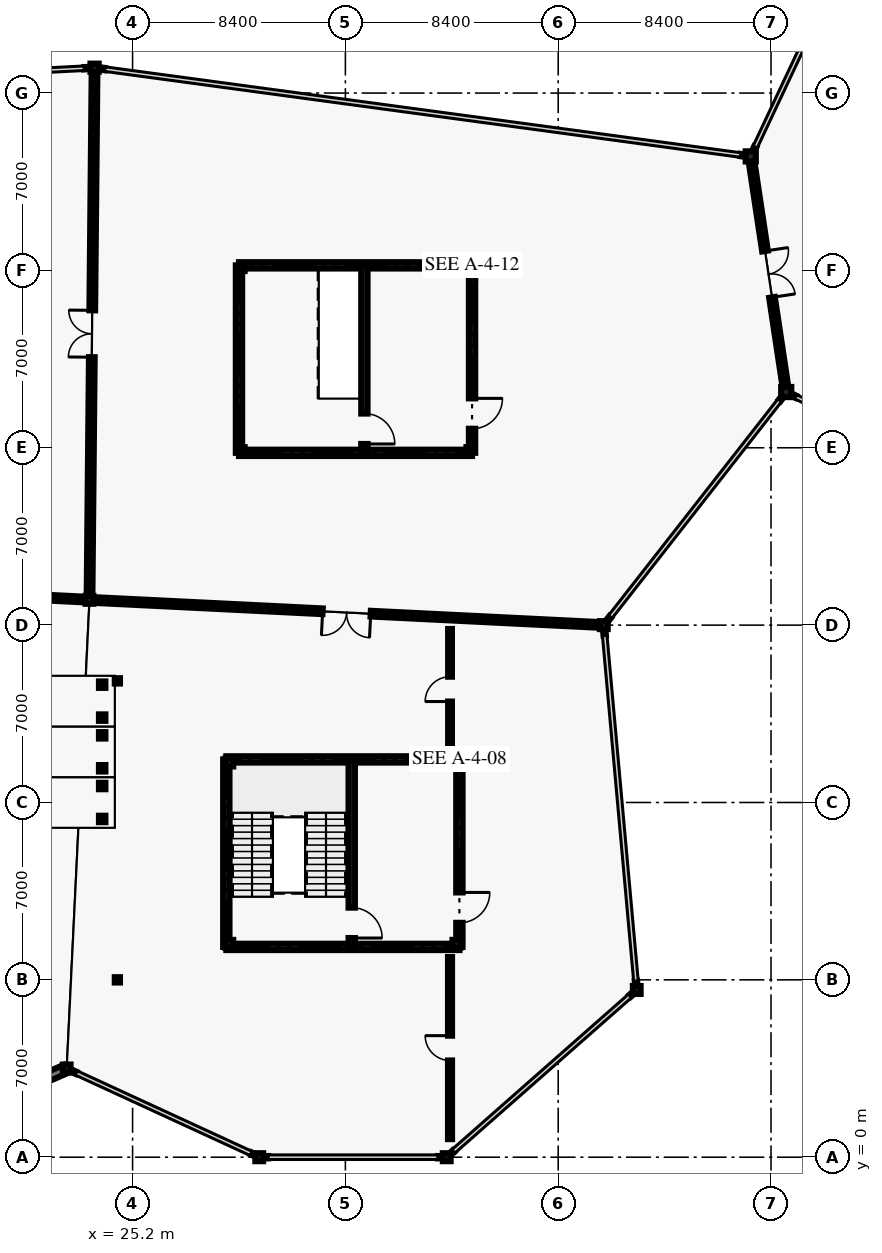
"""IFC4 building model, lengths in metres.
Left out: names, types, materials, properties, quantities, classifications, styles, units other than length and angle.
Written with IfcOpenShell. Run it as: python <this file> out.ifc"""

import sys

from ifc_helpers import new_model, si_unit, direction, frame, frame_2d, origin, origin_2d, place, context, subcontext, project, spatial, rectangle, hollow_circle, i_section, extrude, element, fill, save


model = new_model("IFC4")
c1 = context("Model", 3, precision=1e-05, world=origin(), true_north=direction((0.0, 1.0)))
c2 = subcontext(c1, "Body", "Model", "MODEL_VIEW")
j1 = project(units=[si_unit("LENGTHUNIT", "METRE"), si_unit("PLANEANGLEUNIT", "RADIAN")], contexts=[c1])
p1 = place(None, origin())
s1 = spatial("IfcSite", under=j1, at=p1, CompositionType="ELEMENT")
p2 = place(p1, origin())
s2 = spatial("IfcBuilding", under=s1, at=p2, CompositionType="ELEMENT")
p3 = place(p2, frame((0.0, 0.0, 5.4)))
s3 = spatial("IfcBuildingStorey", under=s2, at=p3, CompositionType="ELEMENT", Elevation=5.4)
for number, where, z_axis, x_axis in (
    (1, (22.6, 3.5, 0.0), (0.0, 0.0, 1.0), (1.0, 0.0, 0.0)),
    (2, (23.5, 22.0, 0.0), (0.0, 0.0, 1.0), (1.0, 0.0, 0.0)),
):
    element("IfcColumn", number, at=place(p3, frame(where, z_axis=z_axis, x_axis=x_axis)), inside=s3, PredefinedType="COLUMN", context=c2, shape_type="SweptSolid", body=[
        extrude(i_section(OverallWidth=0.307, OverallDepth=0.315, WebThickness=0.012, FlangeThickness=0.019, FilletRadius=0.017, at=origin_2d()), origin(), (0.0, 0.0, 1.0), 4.8),
    ])
p4 = place(p3, frame((23.7, 43.0, 0.0), z_axis=(0.0, 0.0, 1.0), x_axis=(1.0, 0.0, 0.0)))
e3 = element("IfcColumn", 3, at=p4, inside=s3, PredefinedType="COLUMN", context=c2, shape_type="SweptSolid", body=[
    extrude(hollow_circle(Radius=0.162, WallThickness=0.01, at=origin_2d()), origin(), (0.0, 0.0, 1.0), 4.8),
])
for number, where, z_axis, x_axis in (
    (4, (30.2, 0.0, 0.0), (0.0, 0.0, 1.0), (1.0, 0.0, 0.0)),
    (5, (37.6, 0.0, 0.0), (0.0, 0.0, 1.0), (1.0, 0.0, 0.0)),
    (6, (43.8, 21.0, 0.0), (0.0, 0.0, 1.0), (1.0, 0.0, 0.0)),
    (7, (45.1, 6.6, 0.0), (0.0, 0.0, 1.0), (1.0, 0.0, 0.0)),
):
    element("IfcColumn", number, at=place(p3, frame(where, z_axis=z_axis, x_axis=x_axis)), inside=s3, PredefinedType="COLUMN", context=c2, shape_type="SweptSolid", body=[
        extrude(i_section(OverallWidth=0.307, OverallDepth=0.315, WebThickness=0.012, FlangeThickness=0.019, FilletRadius=0.017, at=origin_2d()), origin(), (0.0, 0.0, 1.0), 4.8),
    ])
for number, where, z_axis, x_axis in (
    (8, (49.6, 39.5, 0.0), (0.0, 0.0, 1.0), (1.0, 0.0, 0.0)),
    (9, (51.0, 30.2, 0.0), (0.0, 0.0, 1.0), (1.0, 0.0, 0.0)),
):
    element("IfcColumn", number, at=place(p3, frame(where, z_axis=z_axis, x_axis=x_axis)), inside=s3, PredefinedType="COLUMN", context=c2, shape_type="SweptSolid", body=[
        extrude(i_section(OverallWidth=0.4, OverallDepth=0.4, WebThickness=0.022, FlangeThickness=0.036, at=origin_2d()), origin(), (0.0, 0.0, 1.0), 4.8),
    ])
for number, where, z_axis, x_axis in (
    (10, (29.02, 8.42, 0.0), (0.0, 0.0, 1.0), (1.0, 0.0, 0.0)),
    (11, (37.98, 8.42, 0.0), (0.0, 0.0, 1.0), (1.0, 0.0, 0.0)),
    (12, (37.98, 15.58, 0.0), (0.0, 0.0, 1.0), (1.0, 0.0, 0.0)),
    (13, (29.02, 15.58, 0.0), (0.0, 0.0, 1.0), (1.0, 0.0, 0.0)),
):
    element("IfcColumn", number, at=place(p3, frame(where, z_axis=z_axis, x_axis=x_axis)), inside=s3, PredefinedType="COLUMN", context=c2, shape_type="SweptSolid", body=[
        extrude(i_section(OverallWidth=0.307, OverallDepth=0.315, WebThickness=0.012, FlangeThickness=0.019, FilletRadius=0.017, at=origin_2d()), origin(), (0.0, 0.0, 1.0), 4.8),
    ])
for number, where, z_axis, x_axis in (
    (14, (29.52, 27.92, 0.0), (0.0, 0.0, 1.0), (1.0, 0.0, 0.0)),
    (15, (38.48, 27.92, 0.0), (0.0, 0.0, 1.0), (1.0, 0.0, 0.0)),
    (16, (38.48, 35.08, 0.0), (0.0, 0.0, 1.0), (1.0, 0.0, 0.0)),
    (17, (29.52, 35.08, 0.0), (0.0, 0.0, 1.0), (1.0, 0.0, 0.0)),
    (18, (24.6, 7.0, 0.0), (0.0, 0.0, 1.0), (1.0, 0.0, 0.0)),
    (19, (24.6, 18.8, 0.0), (0.0, 0.0, 1.0), (1.0, 0.0, 0.0)),
):
    element("IfcColumn", number, at=place(p3, frame(where, z_axis=z_axis, x_axis=x_axis)), inside=s3, PredefinedType="COLUMN", context=c2, shape_type="SweptSolid", body=[
        extrude(i_section(OverallWidth=0.205, OverallDepth=0.21, WebThickness=0.009, FlangeThickness=0.014, FilletRadius=0.01, at=origin_2d()), origin(), (0.0, 0.0, 1.0), 4.8),
    ])
for number, where, z_axis, x_axis in (
    (20, (24.0, 13.35, 0.0), (0.0, 0.0, 1.0), (1.0, 0.0, 0.0)),
    (21, (24.0, 14.65, 0.0), (0.0, 0.0, 1.0), (1.0, 0.0, 0.0)),
):
    element("IfcColumn", number, at=place(p3, frame(where, z_axis=z_axis, x_axis=x_axis)), inside=s3, PredefinedType="COLUMN", context=c2, shape_type="SweptSolid", body=[
        extrude(i_section(OverallWidth=0.254, OverallDepth=0.254, WebThickness=0.009, FlangeThickness=0.014, FilletRadius=0.013, at=origin_2d()), origin(), (0.0, 0.0, 1.0), 0.295),
    ])
for number, where, z_axis, x_axis in (
    (22, (24.0, 15.35, 0.0), (0.0, 0.0, 1.0), (1.0, 0.0, 0.0)),
    (23, (24.0, 16.65, 0.0), (0.0, 0.0, 1.0), (1.0, 0.0, 0.0)),
):
    element("IfcColumn", number, at=place(p3, frame(where, z_axis=z_axis, x_axis=x_axis)), inside=s3, PredefinedType="COLUMN", context=c2, shape_type="SweptSolid", body=[
        extrude(i_section(OverallWidth=0.254, OverallDepth=0.254, WebThickness=0.009, FlangeThickness=0.014, FilletRadius=0.013, at=origin_2d()), origin(), (0.0, 0.0, 1.0), 0.745),
    ])
for number, where, z_axis, x_axis in (
    (24, (24.0, 17.35, 0.0), (0.0, 0.0, 1.0), (1.0, 0.0, 0.0)),
    (25, (24.0, 18.65, 0.0), (0.0, 0.0, 1.0), (1.0, 0.0, 0.0)),
):
    element("IfcColumn", number, at=place(p3, frame(where, z_axis=z_axis, x_axis=x_axis)), inside=s3, PredefinedType="COLUMN", context=c2, shape_type="SweptSolid", body=[
        extrude(i_section(OverallWidth=0.254, OverallDepth=0.254, WebThickness=0.009, FlangeThickness=0.014, FilletRadius=0.013, at=origin_2d()), origin(), (0.0, 0.0, 1.0), 1.195),
    ])
p5 = place(p3, frame((51.368, 30.018, 0.0), z_axis=(0.0, 0.0, 1.0), x_axis=(-0.896952807524, 0.44212629539, 0.0)))
e26 = element("IfcWall", 26, at=p5, inside=s3, PredefinedType="SOLIDWALL", context=c2, shape_type="SweptSolid", body=[
    extrude(rectangle(XDim=0.308, YDim=0.095, at=frame_2d((0.154, 0.0))), origin(), (0.0, 0.0, 1.0), 3.62),
])
p6 = place(p3, frame((49.644, 39.592, 0.0), z_axis=(0.0, 0.0, 1.0), x_axis=(0.42457593243, 0.905392333522, 0.0)))
e27 = element("IfcWall", 27, at=p6, inside=s3, PredefinedType="SOLIDWALL", context=c2, shape_type="SweptSolid", body=[
    extrude(rectangle(XDim=0.308, YDim=0.095, at=frame_2d((0.154, 0.0))), origin(), (0.0, 0.0, 1.0), 3.62),
])
p7 = place(p3, frame((22.545, 3.476, 0.0), z_axis=(0.0, 0.0, 1.0), x_axis=(-0.916148288852, -0.400839510069, 0.0)))
e28 = element("IfcWall", 28, at=p7, inside=s3, PredefinedType="SOLIDWALL", context=c2, shape_type="SweptSolid", body=[
    extrude(rectangle(XDim=8.672, YDim=0.36, at=frame_2d((4.336, 0.0))), origin(), (0.0, 0.0, 1.0), 3.62),
])
for number, where, z_axis, x_axis in (
    (29, (30.162, 0.018, 0.0), (0.0, 0.0, 1.0), (-0.91, 0.416, 0.0)),
    (30, (22.972, 3.329, 0.0), (0.0, 0.0, 1.0), (-0.91, 0.416, 0.0)),
):
    element("IfcWall", number, at=place(p3, frame(where, z_axis=z_axis, x_axis=x_axis)), inside=s3, PredefinedType="SOLIDWALL", context=c2, shape_type="SweptSolid", body=[
        extrude(rectangle(XDim=0.308, YDim=0.095, at=frame_2d((0.154, 0.0))), origin(), (0.0, 0.0, 1.0), 3.62),
    ])
for number, where, z_axis, x_axis in (
    (31, (37.558, 0.0, 0.0), (0.0, 0.0, 1.0), (-1.0, 0.0, 0.0)),
    (32, (30.55, 0.0, 0.0), (0.0, 0.0, 1.0), (-1.0, 0.0, 0.0)),
):
    element("IfcWall", number, at=place(p3, frame(where, z_axis=z_axis, x_axis=x_axis)), inside=s3, PredefinedType="SOLIDWALL", context=c2, shape_type="SweptSolid", body=[
        extrude(rectangle(XDim=0.308, YDim=0.095, at=frame_2d((0.154, 0.0))), origin(), (0.0, 0.0, 1.0), 3.62),
    ])
p8 = place(p3, frame((45.068, 6.572, 0.0), z_axis=(0.0, 0.0, 1.0), x_axis=(-0.75124833206, -0.660019653932, 0.0)))
e33 = element("IfcWall", 33, at=p8, inside=s3, PredefinedType="SOLIDWALL", context=c2, shape_type="SweptSolid", body=[
    extrude(rectangle(XDim=0.308, YDim=0.095, at=frame_2d((0.154, 0.0))), origin(), (0.0, 0.0, 1.0), 3.62),
])
p9 = place(p3, frame((37.863, 0.231, 0.0), z_axis=(0.0, 0.0, 1.0), x_axis=(-0.751296149946, -0.659965222627, 0.0)))
e34 = element("IfcWall", 34, at=p9, inside=s3, PredefinedType="SOLIDWALL", context=c2, shape_type="SweptSolid", body=[
    extrude(rectangle(XDim=0.307, YDim=0.095, at=frame_2d((0.154, 0.0))), origin(), (0.0, 0.0, 1.0), 3.62),
])
for number, where, z_axis, x_axis in (
    (35, (43.809, 20.898, 0.0), (0.0, 0.0, 1.0), (0.087, -0.996, 0.0)),
    (36, (45.069, 6.949, 0.0), (0.0, 0.0, 1.0), (0.087, -0.996, 0.0)),
):
    element("IfcWall", number, at=place(p3, frame(where, z_axis=z_axis, x_axis=x_axis)), inside=s3, PredefinedType="SOLIDWALL", context=c2, shape_type="SweptSolid", body=[
        extrude(rectangle(XDim=0.308, YDim=0.095, at=frame_2d((0.154, 0.0))), origin(), (0.0, 0.0, 1.0), 3.62),
    ])
p10 = place(p3, frame((23.29, 42.979, 0.0), z_axis=(0.0, 0.0, 1.0), x_axis=(0.998633100652, 0.052267870454, 0.0)))
e37 = element("IfcWall", 37, at=p10, inside=s3, PredefinedType="SOLIDWALL", context=c2, shape_type="SweptSolid", body=[
    extrude(rectangle(XDim=0.308, YDim=0.095, at=frame_2d((0.154, 0.0))), origin(), (0.0, 0.0, 1.0), 3.62),
])
p11 = place(p3, frame((50.937, 30.12, 0.0), z_axis=(0.0, 0.0, 1.0), x_axis=(-0.615582622046, -0.788072354188, 0.0)))
e38 = element("IfcWall", 38, at=p11, inside=s3, PredefinedType="SOLIDWALL", context=c2, shape_type="SweptSolid", body=[
    extrude(rectangle(XDim=0.309, YDim=0.095, at=frame_2d((0.154, 0.0))), origin(), (0.0, 0.0, 1.0), 3.62),
])
p12 = place(p3, frame((44.053, 21.323, 0.0), z_axis=(0.0, 0.0, 1.0), x_axis=(-0.615966636313, -0.787772240529, 0.0)))
e39 = element("IfcWall", 39, at=p12, inside=s3, PredefinedType="SOLIDWALL", context=c2, shape_type="SweptSolid", body=[
    extrude(rectangle(XDim=0.308, YDim=0.095, at=frame_2d((0.154, 0.0))), origin(), (0.0, 0.0, 1.0), 3.62),
])
for number, where, z_axis, x_axis in (
    (40, (23.802, 42.986, 0.0), (0.0, 0.0, 1.0), (0.991, -0.133, 0.0)),
    (41, (49.194, 39.555, 0.0), (0.0, 0.0, 1.0), (0.991, -0.133, 0.0)),
):
    element("IfcWall", number, at=place(p3, frame(where, z_axis=z_axis, x_axis=x_axis)), inside=s3, PredefinedType="SOLIDWALL", context=c2, shape_type="SweptSolid", body=[
        extrude(rectangle(XDim=0.308, YDim=0.095, at=frame_2d((0.154, 0.0))), origin(), (0.0, 0.0, 1.0), 3.62),
    ])
p13 = place(p3, frame((49.6, 39.5, 0.0), z_axis=(0.0, 0.0, 1.0), x_axis=(0.148849460064, -0.988859867847, 0.0)))
e42 = element("IfcWall", 42, at=p13, inside=s3, PredefinedType="SOLIDWALL", context=c2, shape_type="SweptSolid", body=[
    extrude(rectangle(XDim=9.405, YDim=0.225, at=frame_2d((4.702, 0.0))), origin(), (0.0, 0.0, 1.0), 4.02),
])
p14 = place(p13, frame((3.777, 0.0, 0.0)))
e43 = element("IfcOpeningElement", 43, at=p14, cuts=e42, PredefinedType="OPENING", context=c2, shape_type="SweptSolid", body=[
    extrude(rectangle(XDim=1.85, YDim=2.4, at=frame_2d((0.925, 1.2))), frame((0.0, 0.123, 0.0), z_axis=(0.0, -1.0, 0.0), x_axis=(1.0, 0.0, 0.0)), (0.0, 0.0, 1.0), 0.245),
])
p15 = place(p3, frame((23.5, 22.0, 0.0), z_axis=(0.0, 0.0, 1.0), x_axis=(-0.99872706092, 0.050440636263, 0.0)))
e44 = element("IfcWall", 44, at=p15, inside=s3, PredefinedType="SOLIDWALL", context=c2, shape_type="SweptSolid", body=[
    extrude(rectangle(XDim=19.825, YDim=0.225, at=frame_2d((9.913, 0.0))), origin(), (0.0, 0.0, 1.0), 4.02),
])
p16 = place(p15, frame((8.963, 0.0, 0.0)))
e45 = element("IfcOpeningElement", 45, at=p16, cuts=e44, PredefinedType="OPENING", context=c2, shape_type="SweptSolid", body=[
    extrude(rectangle(XDim=1.9, YDim=2.35, at=frame_2d((0.95, 1.175))), frame((0.0, 0.123, 0.0), z_axis=(0.0, -1.0, 0.0), x_axis=(1.0, 0.0, 0.0)), (0.0, 0.0, 1.0), 0.245),
])
p17 = place(p3, frame((43.8, 21.0, 0.0), z_axis=(0.0, 0.0, 1.0), x_axis=(-0.998788882418, 0.049201304434, 0.0)))
e46 = element("IfcWall", 46, at=p17, inside=s3, PredefinedType="SOLIDWALL", context=c2, shape_type="SweptSolid", body=[
    extrude(rectangle(XDim=20.325, YDim=0.225, at=frame_2d((10.162, 0.0))), origin(), (0.0, 0.0, 1.0), 4.02),
])
p18 = place(p17, frame((9.212, 0.0, 0.0)))
e47 = element("IfcOpeningElement", 47, at=p18, cuts=e46, PredefinedType="OPENING", context=c2, shape_type="SweptSolid", body=[
    extrude(rectangle(XDim=1.9, YDim=2.35, at=frame_2d((0.95, 1.175))), frame((0.0, 0.123, 0.0), z_axis=(0.0, -1.0, 0.0), x_axis=(1.0, 0.0, 0.0)), (0.0, 0.0, 1.0), 0.245),
])
p19 = place(p3, frame((23.5, 22.0, 0.0), z_axis=(0.0, 0.0, 1.0), x_axis=(0.009521052802, 0.99995467375, 0.0)))
e48 = element("IfcWall", 48, at=p19, inside=s3, PredefinedType="SOLIDWALL", context=c2, shape_type="SweptSolid", body=[
    extrude(rectangle(XDim=21.001, YDim=0.225, at=frame_2d((10.5, 0.0))), origin(), (0.0, 0.0, 1.0), 4.02),
])
p20 = place(p19, frame((9.575, 0.0, 0.0)))
e49 = element("IfcOpeningElement", 49, at=p20, cuts=e48, PredefinedType="OPENING", context=c2, shape_type="SweptSolid", body=[
    extrude(rectangle(XDim=1.85, YDim=2.4, at=frame_2d((0.925, 1.2))), frame((0.0, 0.123, 0.0), z_axis=(0.0, -1.0, 0.0), x_axis=(1.0, 0.0, 0.0)), (0.0, 0.0, 1.0), 0.245),
])
p21 = place(p3, frame((37.73, 0.714, 0.0), z_axis=(0.0, 0.0, 1.0), x_axis=(0.0, 1.0, 0.0)))
e50 = element("IfcWall", 50, at=p21, inside=s3, PredefinedType="PARTITIONING", context=c2, shape_type="SweptSolid", body=[
    extrude(rectangle(XDim=7.186, YDim=0.16, at=frame_2d((3.593, 0.0))), origin(), (0.0, 0.0, 1.0), 3.32),
])
p22 = place(p21, frame((3.103, 0.0, 0.0)))
e51 = element("IfcOpeningElement", 51, at=p22, cuts=e50, PredefinedType="OPENING", context=c2, shape_type="SweptSolid", body=[
    extrude(rectangle(XDim=0.98, YDim=2.15, at=frame_2d((0.49, 1.075))), frame((0.0, 0.09, 0.0), z_axis=(0.0, -1.0, 0.0), x_axis=(1.0, 0.0, 0.0)), (0.0, 0.0, 1.0), 0.18),
])
p23 = place(p3, frame((37.73, 16.1, 0.0), z_axis=(0.0, 0.0, 1.0), x_axis=(0.0, 1.0, 0.0)))
e52 = element("IfcWall", 52, at=p23, inside=s3, PredefinedType="PARTITIONING", context=c2, shape_type="SweptSolid", body=[
    extrude(rectangle(XDim=4.748, YDim=0.15, at=frame_2d((2.374, 0.0))), origin(), (0.0, 0.0, 1.0), 3.32),
])
p24 = place(p23, frame((1.884, 0.0, 0.0)))
e53 = element("IfcOpeningElement", 53, at=p24, cuts=e52, PredefinedType="OPENING", context=c2, shape_type="SweptSolid", body=[
    extrude(rectangle(XDim=0.98, YDim=2.15, at=frame_2d((0.49, 1.075))), frame((0.0, 0.085, 0.0), z_axis=(0.0, -1.0, 0.0), x_axis=(1.0, 0.0, 0.0)), (0.0, 0.0, 1.0), 0.17),
])
p25 = place(p3, frame((28.9, 8.3, 0.0), z_axis=(0.0, 0.0, 1.0), x_axis=(0.0, 1.0, 0.0)))
e54 = element("IfcWall", 54, at=p25, inside=s3, PredefinedType="SHEAR", context=c2, shape_type="SweptSolid", body=[
    extrude(rectangle(XDim=7.4, YDim=0.25, at=frame_2d((3.7, 0.0))), origin(), (0.0, 0.0, 1.0), 4.56),
])
for number, where, z_axis, x_axis in (
    (55, (28.9, 15.7, 0.0), (0.0, 0.0, 1.0), (1.0, 0.0, 0.0)),
    (56, (38.1, 8.3, 0.0), (0.0, 0.0, 1.0), (-1.0, 0.0, 0.0)),
):
    element("IfcWall", number, at=place(p3, frame(where, z_axis=z_axis, x_axis=x_axis)), inside=s3, PredefinedType="SHEAR", context=c2, shape_type="SweptSolid", body=[
        extrude(rectangle(XDim=9.2, YDim=0.25, at=frame_2d((4.6, 0.0))), origin(), (0.0, 0.0, 1.0), 4.56),
    ])
p26 = place(p3, frame((38.1, 15.7, 0.0), z_axis=(0.0, 0.0, 1.0), x_axis=(0.0, -1.0, 0.0)))
e57 = element("IfcWall", 57, at=p26, inside=s3, PredefinedType="SHEAR", context=c2, shape_type="SweptSolid", body=[
    extrude(rectangle(XDim=7.4, YDim=0.25, at=frame_2d((3.7, 0.0))), origin(), (0.0, 0.0, 1.0), 4.56),
])
p27 = place(p26, frame((5.25, 0.0, 0.0)))
e58 = element("IfcOpeningElement", 58, at=p27, cuts=e57, PredefinedType="OPENING", context=c2, shape_type="SweptSolid", body=[
    extrude(rectangle(XDim=1.2, YDim=2.2, at=frame_2d((0.6, 1.1))), frame((0.0, 0.135, 0.0), z_axis=(0.0, -1.0, 0.0), x_axis=(1.0, 0.0, 0.0)), (0.0, 0.0, 1.0), 0.27),
])
p28 = place(p3, frame((33.85, 15.7, 0.0), z_axis=(0.0, 0.0, 1.0), x_axis=(0.0, -1.0, 0.0)))
e59 = element("IfcWall", 59, at=p28, inside=s3, PredefinedType="SHEAR", context=c2, shape_type="SweptSolid", body=[
    extrude(rectangle(XDim=7.4, YDim=0.25, at=frame_2d((3.7, 0.0))), origin(), (0.0, 0.0, 1.0), 4.56),
])
p29 = place(p28, frame((5.85, 0.0, 0.0)))
e60 = element("IfcOpeningElement", 60, at=p29, cuts=e59, PredefinedType="OPENING", context=c2, shape_type="SweptSolid", body=[
    extrude(rectangle(XDim=1.2, YDim=2.2, at=frame_2d((0.6, 1.1))), frame((0.0, 0.135, 0.0), z_axis=(0.0, -1.0, 0.0), x_axis=(1.0, 0.0, 0.0)), (0.0, 0.0, 1.0), 0.27),
])
p30 = place(p3, frame((29.4, 27.8, 0.0), z_axis=(0.0, 0.0, 1.0), x_axis=(0.0, 1.0, 0.0)))
e61 = element("IfcWall", 61, at=p30, inside=s3, PredefinedType="SHEAR", context=c2, shape_type="SweptSolid", body=[
    extrude(rectangle(XDim=7.4, YDim=0.25, at=frame_2d((3.7, 0.0))), origin(), (0.0, 0.0, 1.0), 4.56),
])
for number, where, z_axis, x_axis in (
    (62, (29.4, 35.2, 0.0), (0.0, 0.0, 1.0), (1.0, 0.0, 0.0)),
    (63, (38.6, 27.8, 0.0), (0.0, 0.0, 1.0), (-1.0, 0.0, 0.0)),
):
    element("IfcWall", number, at=place(p3, frame(where, z_axis=z_axis, x_axis=x_axis)), inside=s3, PredefinedType="SHEAR", context=c2, shape_type="SweptSolid", body=[
        extrude(rectangle(XDim=9.2, YDim=0.25, at=frame_2d((4.6, 0.0))), origin(), (0.0, 0.0, 1.0), 4.56),
    ])
p31 = place(p3, frame((38.6, 35.2, 0.0), z_axis=(0.0, 0.0, 1.0), x_axis=(0.0, -1.0, 0.0)))
e64 = element("IfcWall", 64, at=p31, inside=s3, PredefinedType="SHEAR", context=c2, shape_type="SweptSolid", body=[
    extrude(rectangle(XDim=7.4, YDim=0.25, at=frame_2d((3.7, 0.0))), origin(), (0.0, 0.0, 1.0), 4.56),
])
p32 = place(p31, frame((5.25, 0.0, 0.0)))
e65 = element("IfcOpeningElement", 65, at=p32, cuts=e64, PredefinedType="OPENING", context=c2, shape_type="SweptSolid", body=[
    extrude(rectangle(XDim=1.2, YDim=2.2, at=frame_2d((0.6, 1.1))), frame((0.0, 0.135, 0.0), z_axis=(0.0, -1.0, 0.0), x_axis=(1.0, 0.0, 0.0)), (0.0, 0.0, 1.0), 0.27),
])
p33 = place(p3, frame((34.35, 35.2, 0.0), z_axis=(0.0, 0.0, 1.0), x_axis=(0.0, -1.0, 0.0)))
e66 = element("IfcWall", 66, at=p33, inside=s3, PredefinedType="SHEAR", context=c2, shape_type="SweptSolid", body=[
    extrude(rectangle(XDim=7.4, YDim=0.25, at=frame_2d((3.7, 0.0))), origin(), (0.0, 0.0, 1.0), 4.56),
])
p34 = place(p33, frame((5.85, 0.0, 0.0)))
e67 = element("IfcOpeningElement", 67, at=p34, cuts=e66, PredefinedType="OPENING", context=c2, shape_type="SweptSolid", body=[
    extrude(rectangle(XDim=1.2, YDim=2.2, at=frame_2d((0.6, 1.1))), frame((0.0, 0.135, 0.0), z_axis=(0.0, -1.0, 0.0), x_axis=(1.0, 0.0, 0.0)), (0.0, 0.0, 1.0), 0.27),
])
p35 = place(p14, origin())
e68 = element("IfcDoor", 68, at=p35, inside=s3, OperationType="DOUBLE_DOOR_SINGLE_SWING", PredefinedType="DOOR", context=c2, shape_type="SweptSolid", body=[
    extrude(rectangle(XDim=1.85, YDim=2.4, at=frame_2d((0.925, 1.2))), frame((0.0, 0.025, 0.0), z_axis=(0.0, -1.0, 0.0), x_axis=(1.0, 0.0, 0.0)), (0.0, 0.0, 1.0), 0.05),
])
fill(e43, e68)
p36 = place(p18, origin())
e69 = element("IfcDoor", 69, at=p36, inside=s3, OperationType="DOUBLE_DOOR_SINGLE_SWING", PredefinedType="DOOR", context=c2, shape_type="SweptSolid", body=[
    extrude(rectangle(XDim=1.9, YDim=2.35, at=frame_2d((0.95, 1.175))), frame((0.0, 0.025, 0.0), z_axis=(0.0, -1.0, 0.0), x_axis=(1.0, 0.0, 0.0)), (0.0, 0.0, 1.0), 0.05),
])
fill(e47, e69)
p37 = place(p20, origin())
e70 = element("IfcDoor", 70, at=p37, inside=s3, OperationType="DOUBLE_DOOR_SINGLE_SWING", PredefinedType="DOOR", context=c2, shape_type="SweptSolid", body=[
    extrude(rectangle(XDim=1.85, YDim=2.4, at=frame_2d((0.925, 1.2))), frame((0.0, 0.025, 0.0), z_axis=(0.0, -1.0, 0.0), x_axis=(1.0, 0.0, 0.0)), (0.0, 0.0, 1.0), 0.05),
])
fill(e49, e70)
p38 = place(p22, origin())
e71 = element("IfcDoor", 71, at=p38, inside=s3, OperationType="SINGLE_SWING_RIGHT", PredefinedType="DOOR", context=c2, shape_type="SweptSolid", body=[
    extrude(rectangle(XDim=0.98, YDim=2.15, at=frame_2d((0.49, 1.075))), frame((0.0, 0.025, 0.0), z_axis=(0.0, -1.0, 0.0), x_axis=(1.0, 0.0, 0.0)), (0.0, 0.0, 1.0), 0.05),
])
fill(e51, e71)
p39 = place(p24, origin())
e72 = element("IfcDoor", 72, at=p39, inside=s3, OperationType="SINGLE_SWING_LEFT", PredefinedType="DOOR", context=c2, shape_type="SweptSolid", body=[
    extrude(rectangle(XDim=0.98, YDim=2.15, at=frame_2d((0.49, 1.075))), frame((0.0, 0.025, 0.0), z_axis=(0.0, -1.0, 0.0), x_axis=(1.0, 0.0, 0.0)), (0.0, 0.0, 1.0), 0.05),
])
fill(e53, e72)
p40 = place(p27, origin())
e73 = element("IfcDoor", 73, at=p40, inside=s3, OperationType="SINGLE_SWING_LEFT", PredefinedType="DOOR", context=c2, shape_type="SweptSolid", body=[
    extrude(rectangle(XDim=1.2, YDim=2.2, at=frame_2d((0.6, 1.1))), frame((0.0, 0.025, 0.0), z_axis=(0.0, -1.0, 0.0), x_axis=(1.0, 0.0, 0.0)), (0.0, 0.0, 1.0), 0.05),
])
fill(e58, e73)
p41 = place(p29, origin())
e74 = element("IfcDoor", 74, at=p41, inside=s3, OperationType="SINGLE_SWING_RIGHT", PredefinedType="DOOR", context=c2, shape_type="SweptSolid", body=[
    extrude(rectangle(XDim=1.2, YDim=2.2, at=frame_2d((0.6, 1.1))), frame((0.0, 0.025, 0.0), z_axis=(0.0, -1.0, 0.0), x_axis=(1.0, 0.0, 0.0)), (0.0, 0.0, 1.0), 0.05),
])
fill(e60, e74)
p42 = place(p32, origin())
e75 = element("IfcDoor", 75, at=p42, inside=s3, OperationType="SINGLE_SWING_LEFT", PredefinedType="DOOR", context=c2, shape_type="SweptSolid", body=[
    extrude(rectangle(XDim=1.2, YDim=2.2, at=frame_2d((0.6, 1.1))), frame((0.0, 0.025, 0.0), z_axis=(0.0, -1.0, 0.0), x_axis=(1.0, 0.0, 0.0)), (0.0, 0.0, 1.0), 0.05),
])
fill(e65, e75)
p43 = place(p34, origin())
e76 = element("IfcDoor", 76, at=p43, inside=s3, OperationType="SINGLE_SWING_RIGHT", PredefinedType="DOOR", context=c2, shape_type="SweptSolid", body=[
    extrude(rectangle(XDim=1.2, YDim=2.2, at=frame_2d((0.6, 1.1))), frame((0.0, 0.025, 0.0), z_axis=(0.0, -1.0, 0.0), x_axis=(1.0, 0.0, 0.0)), (0.0, 0.0, 1.0), 0.05),
])
fill(e67, e76)
save(model, sys.argv[1])
